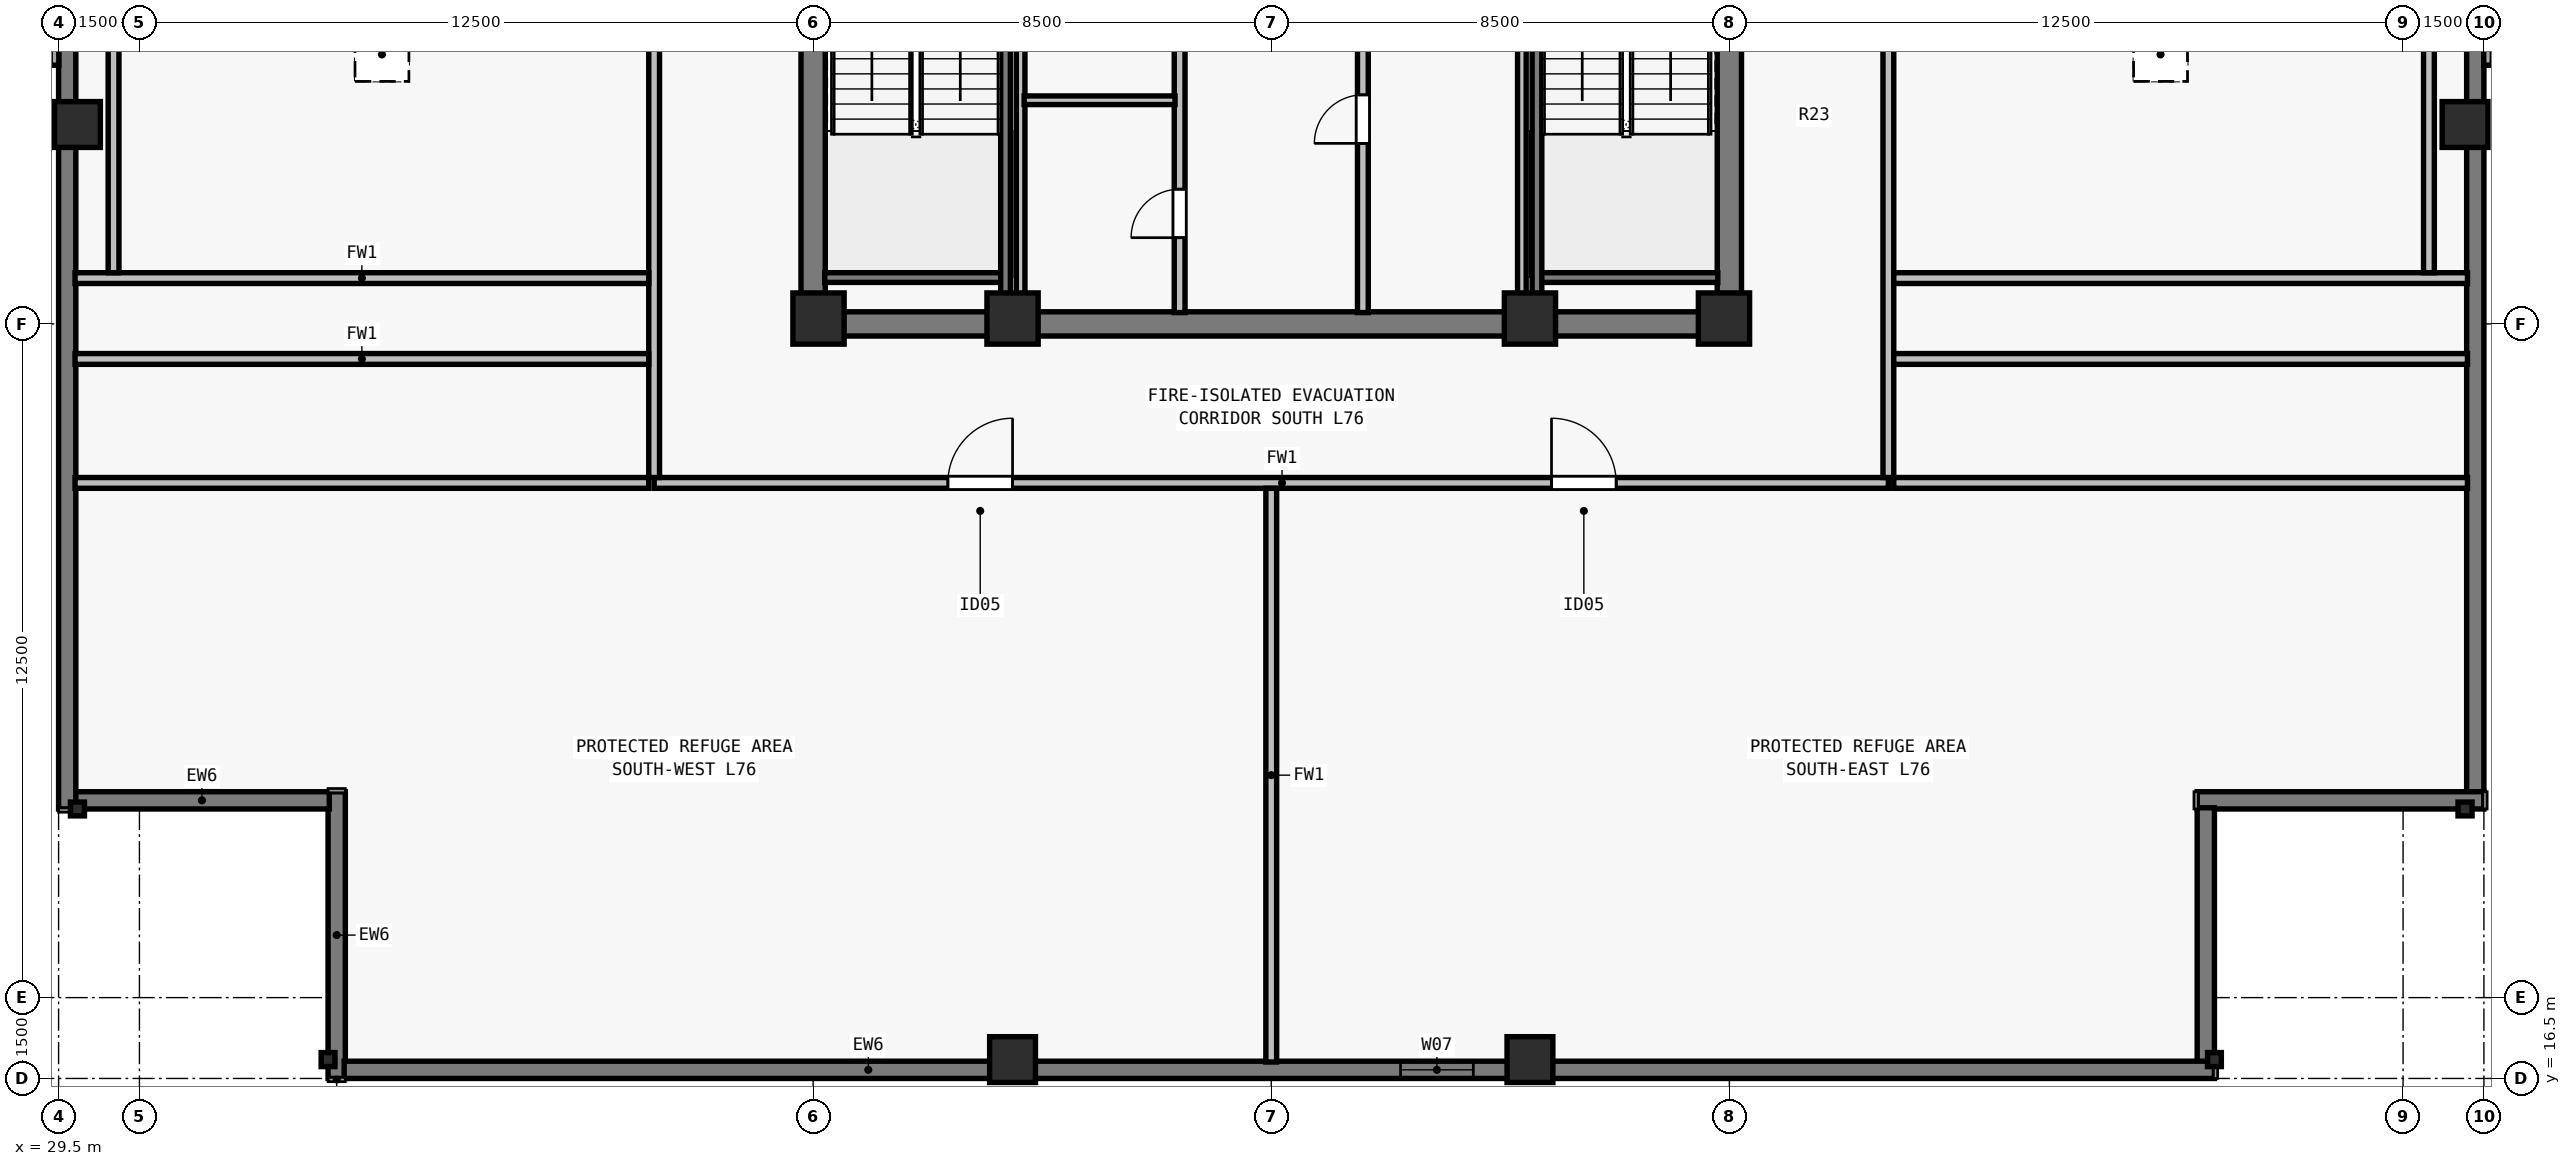
"""IFC4 building model, lengths in metres.
Left out: names, types, materials, properties, quantities, classifications, styles, units other than length and angle.
Written with IfcOpenShell. Run it as: python <this file> out.ifc"""

import sys

from ifc_helpers import new_model, si_unit, direction, frame, frame_2d, origin, origin_2d, place, context, subcontext, project, spatial, rectangle, i_section, extrude, element, fill, save


model = new_model("IFC4")
c1 = context("Model", 3, precision=1e-05, world=origin(), true_north=direction((0.0, 1.0)))
c2 = subcontext(c1, "Body", "Model", "MODEL_VIEW")
j1 = project(units=[si_unit("LENGTHUNIT", "METRE"), si_unit("PLANEANGLEUNIT", "RADIAN")], contexts=[c1])
p1 = place(None, origin())
s1 = spatial("IfcSite", under=j1, at=p1, CompositionType="ELEMENT")
p2 = place(p1, origin())
s2 = spatial("IfcBuilding", under=s1, at=p2, CompositionType="ELEMENT")
p3 = place(p2, frame((0.0, 0.0, 276.0)))
s3 = spatial("IfcBuildingStorey", under=s2, at=p3, CompositionType="ELEMENT", Elevation=276.0)
for number, where, z_axis, x_axis in (
    (1, (43.6, 30.6, 0.0), (0.0, 0.0, 1.0), (1.0, 0.0, 0.0)),
    (2, (47.2, 30.6, 0.0), (0.0, 0.0, 1.0), (1.0, 0.0, 0.0)),
    (3, (56.8, 30.6, 0.0), (0.0, 0.0, 1.0), (1.0, 0.0, 0.0)),
    (4, (60.4, 30.6, 0.0), (0.0, 0.0, 1.0), (1.0, 0.0, 0.0)),
):
    element("IfcColumn", number, at=place(p3, frame(where, z_axis=z_axis, x_axis=x_axis)), inside=s3, PredefinedType="COLUMN", context=c2, shape_type="SweptSolid", body=[
        extrude(rectangle(XDim=0.95, YDim=0.95, at=origin_2d()), origin(), (0.0, 0.0, 1.0), 4.5),
    ])
p4 = place(p3, frame((34.5, 16.85, 0.0), z_axis=(0.0, 0.0, 1.0), x_axis=(1.0, 0.0, 0.0)))
e5 = element("IfcColumn", 5, at=p4, inside=s3, PredefinedType="COLUMN", context=c2, shape_type="SweptSolid", body=[
    extrude(i_section(OverallWidth=0.256, OverallDepth=0.26, WebThickness=0.01, FlangeThickness=0.017, FilletRadius=0.013, at=origin_2d()), origin(), (0.0, 0.0, 1.0), 4.5),
])
for number, where, z_axis, x_axis in (
    (6, (47.2, 16.85, 0.0), (0.0, 0.0, 1.0), (1.0, 0.0, 0.0)),
    (7, (56.8, 16.85, 0.0), (0.0, 0.0, 1.0), (1.0, 0.0, 0.0)),
):
    element("IfcColumn", number, at=place(p3, frame(where, z_axis=z_axis, x_axis=x_axis)), inside=s3, PredefinedType="COLUMN", context=c2, shape_type="SweptSolid", body=[
        extrude(rectangle(XDim=0.85, YDim=0.85, at=origin_2d()), origin(), (0.0, 0.0, 1.0), 4.5),
    ])
for number, where, z_axis, x_axis in (
    (8, (69.5, 16.85, 0.0), (0.0, 0.0, 1.0), (1.0, 0.0, 0.0)),
    (9, (74.15, 21.5, 0.0), (0.0, 0.0, 1.0), (0.0, 1.0, 0.0)),
):
    element("IfcColumn", number, at=place(p3, frame(where, z_axis=z_axis, x_axis=x_axis)), inside=s3, PredefinedType="COLUMN", context=c2, shape_type="SweptSolid", body=[
        extrude(i_section(OverallWidth=0.256, OverallDepth=0.26, WebThickness=0.01, FlangeThickness=0.017, FilletRadius=0.013, at=origin_2d()), origin(), (0.0, 0.0, 1.0), 4.5),
    ])
for number, where, z_axis, x_axis in (
    (10, (74.15, 34.2, 0.0), (0.0, 0.0, 1.0), (0.0, 1.0, 0.0)),
    (11, (29.85, 34.2, 0.0), (0.0, 0.0, 1.0), (0.0, 1.0, 0.0)),
):
    element("IfcColumn", number, at=place(p3, frame(where, z_axis=z_axis, x_axis=x_axis)), inside=s3, PredefinedType="COLUMN", context=c2, shape_type="SweptSolid", body=[
        extrude(rectangle(XDim=0.85, YDim=0.85, at=origin_2d()), origin(), (0.0, 0.0, 1.0), 4.5),
    ])
p5 = place(p3, frame((29.85, 21.5, 0.0), z_axis=(0.0, 0.0, 1.0), x_axis=(0.0, 1.0, 0.0)))
e12 = element("IfcColumn", 12, at=p5, inside=s3, PredefinedType="COLUMN", context=c2, shape_type="SweptSolid", body=[
    extrude(i_section(OverallWidth=0.256, OverallDepth=0.26, WebThickness=0.01, FlangeThickness=0.017, FilletRadius=0.013, at=origin_2d()), origin(), (0.0, 0.0, 1.0), 4.5),
])
p6 = place(p3, frame((34.66, 16.5, 0.0), z_axis=(0.0, 0.0, 1.0), x_axis=(0.0, 1.0, 0.0)))
e13 = element("IfcWall", 13, at=p6, inside=s3, PredefinedType="SOLIDWALL", context=c2, shape_type="SweptSolid", body=[
    extrude(rectangle(XDim=5.32, YDim=0.32, at=frame_2d((2.66, 0.0))), origin(), (0.0, 0.0, 1.0), 4.29),
])
p7 = place(p3, frame((34.522, 21.66, 0.0), z_axis=(0.0, 0.0, 1.0), x_axis=(-1.0, 0.0, 0.0)))
e14 = element("IfcWall", 14, at=p7, inside=s3, PredefinedType="SOLIDWALL", context=c2, shape_type="SweptSolid", body=[
    extrude(rectangle(XDim=4.724, YDim=0.32, at=frame_2d((2.362, 0.0))), origin(), (0.0, 0.0, 1.0), 4.29),
])
for number, where, z_axis, x_axis in (
    (15, (29.66, 21.5, 0.0), (0.0, 0.0, 1.0), (0.0, 1.0, 0.0)),
    (16, (74.34, 56.5, 0.0), (0.0, 0.0, 1.0), (0.0, -1.0, 0.0)),
):
    element("IfcWall", number, at=place(p3, frame(where, z_axis=z_axis, x_axis=x_axis)), inside=s3, PredefinedType="SOLIDWALL", context=c2, shape_type="SweptSolid", body=[
        extrude(rectangle(XDim=34.702, YDim=0.32, at=frame_2d((17.351, 0.0))), origin(), (0.0, 0.0, 1.0), 4.29),
    ])
p8 = place(p3, frame((74.5, 21.66, 0.0), z_axis=(0.0, 0.0, 1.0), x_axis=(-1.0, 0.0, 0.0)))
e17 = element("IfcWall", 17, at=p8, inside=s3, PredefinedType="SOLIDWALL", context=c2, shape_type="SweptSolid", body=[
    extrude(rectangle(XDim=5.32, YDim=0.32, at=frame_2d((2.66, 0.0))), origin(), (0.0, 0.0, 1.0), 4.29),
])
p9 = place(p3, frame((69.34, 21.522, 0.0), z_axis=(0.0, 0.0, 1.0), x_axis=(0.0, -1.0, 0.0)))
e18 = element("IfcWall", 18, at=p9, inside=s3, PredefinedType="SOLIDWALL", context=c2, shape_type="SweptSolid", body=[
    extrude(rectangle(XDim=4.724, YDim=0.32, at=frame_2d((2.362, 0.0))), origin(), (0.0, 0.0, 1.0), 4.29),
])
p10 = place(p3, frame((69.5, 16.66, 0.0), z_axis=(0.0, 0.0, 1.0), x_axis=(-1.0, 0.0, 0.0)))
e19 = element("IfcWall", 19, at=p10, inside=s3, PredefinedType="SOLIDWALL", context=c2, shape_type="SweptSolid", body=[
    extrude(rectangle(XDim=34.702, YDim=0.32, at=frame_2d((17.351, 0.0))), origin(), (0.0, 0.0, 1.0), 4.29),
])
p11 = place(p10, frame((13.751, 0.0, 0.8)))
e20 = element("IfcOpeningElement", 20, at=p11, cuts=e19, PredefinedType="OPENING", context=c2, shape_type="SweptSolid", body=[
    extrude(rectangle(XDim=1.35, YDim=1.54, at=frame_2d((0.675, 0.77))), frame((0.0, 0.17, 0.0), z_axis=(0.0, -1.0, 0.0), x_axis=(1.0, 0.0, 0.0)), (0.0, 0.0, 1.0), 0.34),
])
p12 = place(p3, frame((43.275, 30.5, 0.0), z_axis=(0.0, 0.0, 1.0), x_axis=(1.0, 0.0, 0.0)))
e21 = element("IfcWall", 21, at=p12, inside=s3, PredefinedType="SHEAR", context=c2, shape_type="SweptSolid", body=[
    extrude(rectangle(XDim=17.45, YDim=0.45, at=frame_2d((8.725, 0.0))), origin(), (0.0, 0.0, 1.0), 4.29),
])
for number, where, z_axis, x_axis in (
    (22, (43.5, 30.715, 0.0), (0.0, 0.0, 1.0), (0.0, 1.0, 0.0)),
    (23, (60.5, 30.715, 0.0), (0.0, 0.0, 1.0), (0.0, 1.0, 0.0)),
):
    element("IfcWall", number, at=place(p3, frame(where, z_axis=z_axis, x_axis=x_axis)), inside=s3, PredefinedType="SHEAR", context=c2, shape_type="SweptSolid", body=[
        extrude(rectangle(XDim=8.035, YDim=0.45, at=frame_2d((4.018, 0.0))), origin(), (0.0, 0.0, 1.0), 4.29),
    ])
p13 = place(p3, frame((50.3, 30.71, 0.0), z_axis=(0.0, 0.0, 1.0), x_axis=(0.0, 1.0, 0.0)))
e24 = element("IfcWall", 24, at=p13, inside=s3, PredefinedType="SOLIDWALL", context=c2, shape_type="SweptSolid", body=[
    extrude(rectangle(XDim=7.905, YDim=0.2, at=frame_2d((3.953, 0.0))), origin(), (0.0, 0.0, 1.0), 4.29),
])
p14 = place(p13, frame((1.39, 0.0, 0.0)))
e25 = element("IfcOpeningElement", 25, at=p14, cuts=e24, PredefinedType="OPENING", context=c2, shape_type="SweptSolid", body=[
    extrude(rectangle(XDim=0.9, YDim=2.12, at=frame_2d((0.45, 1.06))), frame((0.0, 0.11, 0.0), z_axis=(0.0, -1.0, 0.0), x_axis=(1.0, 0.0, 0.0)), (0.0, 0.0, 1.0), 0.22),
])
p15 = place(p13, frame((5.39, 0.0, 0.0)))
e26 = element("IfcOpeningElement", 26, at=p15, cuts=e24, PredefinedType="OPENING", context=c2, shape_type="SweptSolid", body=[
    extrude(rectangle(XDim=0.9, YDim=2.12, at=frame_2d((0.45, 1.06))), frame((0.0, 0.11, 0.0), z_axis=(0.0, -1.0, 0.0), x_axis=(1.0, 0.0, 0.0)), (0.0, 0.0, 1.0), 0.22),
])
p16 = place(p3, frame((53.7, 30.71, 0.0), z_axis=(0.0, 0.0, 1.0), x_axis=(0.0, 1.0, 0.0)))
e27 = element("IfcWall", 27, at=p16, inside=s3, PredefinedType="SOLIDWALL", context=c2, shape_type="SweptSolid", body=[
    extrude(rectangle(XDim=7.905, YDim=0.2, at=frame_2d((3.953, 0.0))), origin(), (0.0, 0.0, 1.0), 4.29),
])
p17 = place(p16, frame((3.14, 0.0, 0.0)))
e28 = element("IfcOpeningElement", 28, at=p17, cuts=e27, PredefinedType="OPENING", context=c2, shape_type="SweptSolid", body=[
    extrude(rectangle(XDim=0.9, YDim=2.12, at=frame_2d((0.45, 1.06))), frame((0.0, 0.11, 0.0), z_axis=(0.0, -1.0, 0.0), x_axis=(1.0, 0.0, 0.0)), (0.0, 0.0, 1.0), 0.22),
])
p18 = place(p3, frame((47.35, 30.71, 0.0), z_axis=(0.0, 0.0, 1.0), x_axis=(0.0, 1.0, 0.0)))
e29 = element("IfcWall", 29, at=p18, inside=s3, PredefinedType="PARTITIONING", context=c2, shape_type="SweptSolid", body=[
    extrude(rectangle(XDim=7.905, YDim=0.16, at=frame_2d((3.953, 0.0))), origin(), (0.0, 0.0, 1.0), 4.29),
])
p19 = place(p3, frame((47.415, 34.65, 0.0), z_axis=(0.0, 0.0, 1.0), x_axis=(1.0, 0.0, 0.0)))
e30 = element("IfcWall", 30, at=p19, inside=s3, PredefinedType="PARTITIONING", context=c2, shape_type="SweptSolid", body=[
    extrude(rectangle(XDim=2.8, YDim=0.16, at=frame_2d((1.4, 0.0))), origin(), (0.0, 0.0, 1.0), 4.29),
])
p20 = place(p3, frame((56.65, 30.71, 0.0), z_axis=(0.0, 0.0, 1.0), x_axis=(0.0, 1.0, 0.0)))
e31 = element("IfcWall", 31, at=p20, inside=s3, PredefinedType="PARTITIONING", context=c2, shape_type="SweptSolid", body=[
    extrude(rectangle(XDim=7.905, YDim=0.16, at=frame_2d((3.953, 0.0))), origin(), (0.0, 0.0, 1.0), 4.29),
])
p21 = place(p3, frame((40.55, 27.55, 0.0), z_axis=(0.0, 0.0, 1.0), x_axis=(1.0, 0.0, 0.0)))
e32 = element("IfcWall", 32, at=p21, inside=s3, PredefinedType="SOLIDWALL", context=c2, shape_type="SweptSolid", body=[
    extrude(rectangle(XDim=22.9, YDim=0.2, at=frame_2d((11.45, 0.0))), origin(), (0.0, 0.0, 1.0), 4.29),
])
p22 = place(p21, frame((5.45, 0.0, 0.0)))
e33 = element("IfcOpeningElement", 33, at=p22, cuts=e32, PredefinedType="OPENING", context=c2, shape_type="SweptSolid", body=[
    extrude(rectangle(XDim=1.2, YDim=2.15, at=frame_2d((0.6, 1.075))), frame((0.0, 0.11, 0.0), z_axis=(0.0, -1.0, 0.0), x_axis=(1.0, 0.0, 0.0)), (0.0, 0.0, 1.0), 0.22),
])
p23 = place(p21, frame((16.65, 0.0, 0.0)))
e34 = element("IfcOpeningElement", 34, at=p23, cuts=e32, PredefinedType="OPENING", context=c2, shape_type="SweptSolid", body=[
    extrude(rectangle(XDim=1.2, YDim=2.15, at=frame_2d((0.6, 1.075))), frame((0.0, 0.11, 0.0), z_axis=(0.0, -1.0, 0.0), x_axis=(1.0, 0.0, 0.0)), (0.0, 0.0, 1.0), 0.22),
])
p24 = place(p3, frame((40.55, 27.65, 0.0), z_axis=(0.0, 0.0, 1.0), x_axis=(0.0, 1.0, 0.0)))
e35 = element("IfcWall", 35, at=p24, inside=s3, PredefinedType="SOLIDWALL", context=c2, shape_type="SweptSolid", body=[
    extrude(rectangle(XDim=22.7, YDim=0.2, at=frame_2d((11.35, 0.0))), origin(), (0.0, 0.0, 1.0), 4.29),
])
p25 = place(p24, frame((9.2, 0.0, 0.0)))
e36 = element("IfcOpeningElement", 36, at=p25, cuts=e35, PredefinedType="OPENING", context=c2, shape_type="SweptSolid", body=[
    extrude(rectangle(XDim=1.6, YDim=2.2, at=frame_2d((0.8, 1.1))), frame((0.0, 0.11, 0.0), z_axis=(0.0, -1.0, 0.0), x_axis=(1.0, 0.0, 0.0)), (0.0, 0.0, 1.0), 0.22),
])
p26 = place(p3, frame((63.45, 27.65, 0.0), z_axis=(0.0, 0.0, 1.0), x_axis=(0.0, 1.0, 0.0)))
e37 = element("IfcWall", 37, at=p26, inside=s3, PredefinedType="SOLIDWALL", context=c2, shape_type="SweptSolid", body=[
    extrude(rectangle(XDim=22.7, YDim=0.2, at=frame_2d((11.35, 0.0))), origin(), (0.0, 0.0, 1.0), 4.29),
])
p27 = place(p26, frame((9.2, 0.0, 0.0)))
e38 = element("IfcOpeningElement", 38, at=p27, cuts=e37, PredefinedType="OPENING", context=c2, shape_type="SweptSolid", body=[
    extrude(rectangle(XDim=1.6, YDim=2.2, at=frame_2d((0.8, 1.1))), frame((0.0, 0.11, 0.0), z_axis=(0.0, -1.0, 0.0), x_axis=(1.0, 0.0, 0.0)), (0.0, 0.0, 1.0), 0.22),
])
for number, where, z_axis, x_axis in (
    (39, (29.805, 29.85, 0.0), (0.0, 0.0, 1.0), (1.0, 0.0, 0.0)),
    (40, (63.55, 29.85, 0.0), (0.0, 0.0, 1.0), (1.0, 0.0, 0.0)),
):
    element("IfcWall", number, at=place(p3, frame(where, z_axis=z_axis, x_axis=x_axis)), inside=s3, PredefinedType="SOLIDWALL", context=c2, shape_type="SweptSolid", body=[
        extrude(rectangle(XDim=10.645, YDim=0.2, at=frame_2d((5.323, 0.0))), origin(), (0.0, 0.0, 1.0), 4.29),
    ])
for number, where, z_axis, x_axis in (
    (41, (29.805, 31.35, 0.0), (0.0, 0.0, 1.0), (1.0, 0.0, 0.0)),
    (42, (63.55, 31.35, 0.0), (0.0, 0.0, 1.0), (1.0, 0.0, 0.0)),
):
    element("IfcWall", number, at=place(p3, frame(where, z_axis=z_axis, x_axis=x_axis)), inside=s3, PredefinedType="SOLIDWALL", context=c2, shape_type="SweptSolid", body=[
        extrude(rectangle(XDim=10.645, YDim=0.2, at=frame_2d((5.323, 0.0))), origin(), (0.0, 0.0, 1.0), 2.465),
    ])
for number, where, z_axis, x_axis in (
    (43, (30.52, 31.45, 0.0), (0.0, 0.0, 1.0), (0.0, 1.0, 0.0)),
    (44, (73.48, 31.45, 0.0), (0.0, 0.0, 1.0), (0.0, 1.0, 0.0)),
):
    element("IfcWall", number, at=place(p3, frame(where, z_axis=z_axis, x_axis=x_axis)), inside=s3, PredefinedType="SOLIDWALL", context=c2, shape_type="SweptSolid", body=[
        extrude(rectangle(XDim=15.1, YDim=0.2, at=frame_2d((7.55, 0.0))), origin(), (0.0, 0.0, 1.0), 4.29),
    ])
for number, where, z_axis, x_axis in (
    (45, (52.0, 16.805, 0.0), (0.0, 0.0, 1.0), (0.0, 1.0, 0.0)),
    (46, (29.805, 27.55, 0.0), (0.0, 0.0, 1.0), (1.0, 0.0, 0.0)),
    (47, (63.55, 27.55, 0.0), (0.0, 0.0, 1.0), (1.0, 0.0, 0.0)),
):
    element("IfcWall", number, at=place(p3, frame(where, z_axis=z_axis, x_axis=x_axis)), inside=s3, PredefinedType="SOLIDWALL", context=c2, shape_type="SweptSolid", body=[
        extrude(rectangle(XDim=10.645, YDim=0.2, at=frame_2d((5.323, 0.0))), origin(), (0.0, 0.0, 1.0), 3.958),
    ])
p28 = place(p3, frame((43.715, 31.36, 0.0), z_axis=(0.0, 0.0, 1.0), x_axis=(1.0, 0.0, 0.0)))
e48 = element("IfcWall", 48, at=p28, inside=s3, PredefinedType="SOLIDWALL", context=c2, shape_type="SweptSolid", body=[
    extrude(rectangle(XDim=3.28, YDim=0.18, at=frame_2d((1.64, 0.0))), origin(), (0.0, 0.0, 1.0), 4.29),
])
p29 = place(p3, frame((47.07, 38.78, 0.0), z_axis=(0.0, 0.0, 1.0), x_axis=(0.0, -1.0, 0.0)))
e49 = element("IfcWall", 49, at=p29, inside=s3, PredefinedType="SOLIDWALL", context=c2, shape_type="SweptSolid", body=[
    extrude(rectangle(XDim=8.067, YDim=0.18, at=frame_2d((4.034, 0.0))), origin(), (0.0, 0.0, 1.0), 4.29),
])
p30 = place(p3, frame((57.005, 31.36, 0.0), z_axis=(0.0, 0.0, 1.0), x_axis=(1.0, 0.0, 0.0)))
e50 = element("IfcWall", 50, at=p30, inside=s3, PredefinedType="SOLIDWALL", context=c2, shape_type="SweptSolid", body=[
    extrude(rectangle(XDim=3.28, YDim=0.18, at=frame_2d((1.64, 0.0))), origin(), (0.0, 0.0, 1.0), 4.29),
])
p31 = place(p3, frame((56.93, 38.78, 0.0), z_axis=(0.0, 0.0, 1.0), x_axis=(0.0, -1.0, 0.0)))
e51 = element("IfcWall", 51, at=p31, inside=s3, PredefinedType="SOLIDWALL", context=c2, shape_type="SweptSolid", body=[
    extrude(rectangle(XDim=8.067, YDim=0.18, at=frame_2d((4.034, 0.0))), origin(), (0.0, 0.0, 1.0), 4.29),
])
p32 = place(p3, frame((0.0, 0.0, -0.26)))
p33 = place(p32, frame((35.5, 35.5, 0.0)))
p34 = place(p33, frame((0.0, 0.0, 0.21)))
e52 = element("IfcDoor", 52, at=p34, inside=s3, OperationType="SINGLE_SWING_LEFT", PredefinedType="TRAPDOOR", context=c2, shape_type="SweptSolid", body=[
    extrude(rectangle(XDim=1.0, YDim=1.0, at=origin_2d()), origin(), (0.0, 0.0, 1.0), 0.05),
])
p35 = place(p32, frame((68.5, 35.5, 0.0)))
p36 = place(p35, frame((0.0, 0.0, 0.21)))
e53 = element("IfcDoor", 53, at=p36, inside=s3, OperationType="SINGLE_SWING_LEFT", PredefinedType="TRAPDOOR", context=c2, shape_type="SweptSolid", body=[
    extrude(rectangle(XDim=1.0, YDim=1.0, at=origin_2d()), origin(), (0.0, 0.0, 1.0), 0.05),
])
p37 = place(p11, origin())
e54 = element("IfcWindow", 54, at=p37, inside=s3, PartitioningType="SINGLE_PANEL", PredefinedType="WINDOW", context=c2, shape_type="SweptSolid", body=[
    extrude(rectangle(XDim=1.35, YDim=1.54, at=frame_2d((0.675, 0.77))), frame((0.0, -0.04, 0.0), z_axis=(0.0, -1.0, 0.0), x_axis=(1.0, 0.0, 0.0)), (0.0, 0.0, 1.0), 0.06),
])
fill(e20, e54)
p38 = place(p14, origin())
e55 = element("IfcDoor", 55, at=p38, inside=s3, OperationType="SINGLE_SWING_LEFT", PredefinedType="DOOR", context=c2, shape_type="SweptSolid", body=[
    extrude(rectangle(XDim=0.9, YDim=2.12, at=frame_2d((0.45, 1.06))), frame((0.0, 0.025, 0.0), z_axis=(0.0, -1.0, 0.0), x_axis=(1.0, 0.0, 0.0)), (0.0, 0.0, 1.0), 0.05),
])
fill(e25, e55)
p39 = place(p17, origin())
e56 = element("IfcDoor", 56, at=p39, inside=s3, OperationType="SINGLE_SWING_LEFT", PredefinedType="DOOR", context=c2, shape_type="SweptSolid", body=[
    extrude(rectangle(XDim=0.9, YDim=2.12, at=frame_2d((0.45, 1.06))), frame((0.0, 0.025, 0.0), z_axis=(0.0, -1.0, 0.0), x_axis=(1.0, 0.0, 0.0)), (0.0, 0.0, 1.0), 0.05),
])
fill(e28, e56)
p40 = place(p22, origin())
e57 = element("IfcDoor", 57, at=p40, inside=s3, OperationType="SINGLE_SWING_RIGHT", PredefinedType="DOOR", context=c2, shape_type="SweptSolid", body=[
    extrude(rectangle(XDim=1.2, YDim=2.15, at=frame_2d((0.6, 1.075))), frame((0.0, 0.025, 0.0), z_axis=(0.0, -1.0, 0.0), x_axis=(1.0, 0.0, 0.0)), (0.0, 0.0, 1.0), 0.05),
])
fill(e33, e57)
p41 = place(p23, origin())
e58 = element("IfcDoor", 58, at=p41, inside=s3, OperationType="SINGLE_SWING_LEFT", PredefinedType="DOOR", context=c2, shape_type="SweptSolid", body=[
    extrude(rectangle(XDim=1.2, YDim=2.15, at=frame_2d((0.6, 1.075))), frame((0.0, 0.025, 0.0), z_axis=(0.0, -1.0, 0.0), x_axis=(1.0, 0.0, 0.0)), (0.0, 0.0, 1.0), 0.05),
])
fill(e34, e58)
save(model, sys.argv[1])
